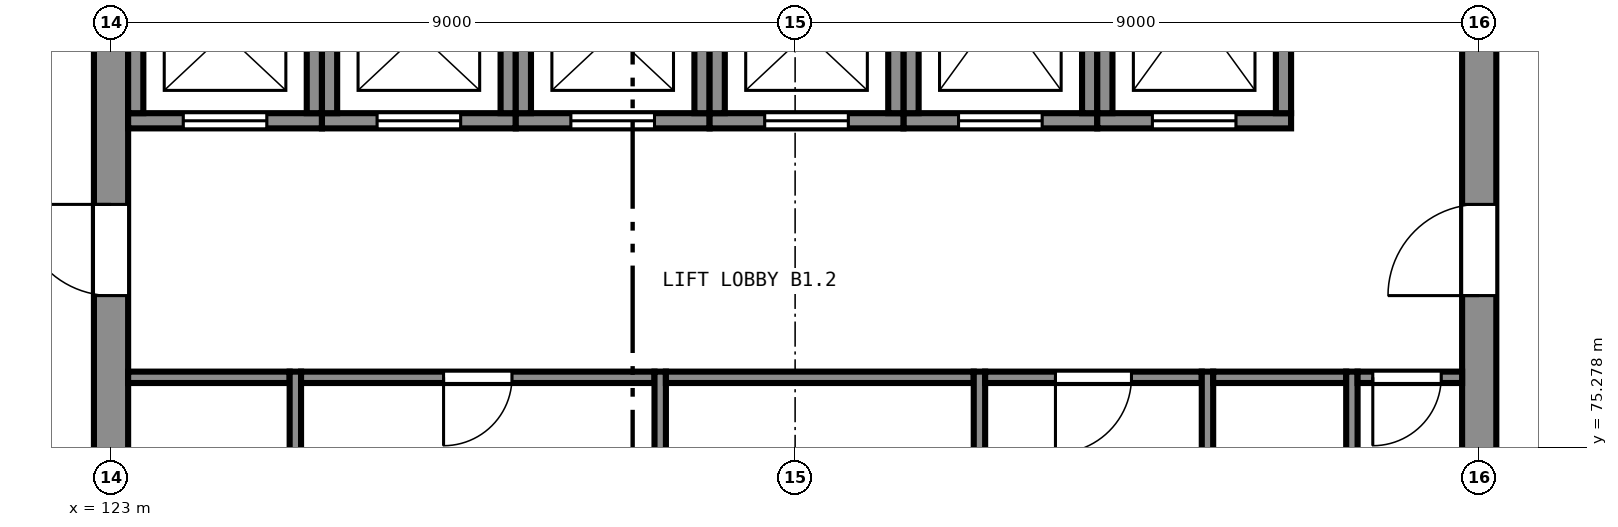
"""IFC4 building model, lengths in metres.
Left out: names, types, materials, properties, quantities, classifications, styles, units other than length and angle.
Written with IfcOpenShell. Run it as: python <this file> out.ifc"""

import sys

from ifc_helpers import new_model, si_unit, direction, frame, frame_2d, origin, place, context, subcontext, project, spatial, rectangle, extrude, element, fill, save


model = new_model("IFC4")
c1 = context("Model", 3, precision=1e-05, world=origin(), true_north=direction((0.0, 1.0)))
c2 = subcontext(c1, "Body", "Model", "MODEL_VIEW")
j1 = project(units=[si_unit("LENGTHUNIT", "METRE"), si_unit("PLANEANGLEUNIT", "RADIAN")], contexts=[c1])
p1 = place(None, origin())
s1 = spatial("IfcSite", under=j1, at=p1, CompositionType="ELEMENT")
p2 = place(p1, origin())
s2 = spatial("IfcBuilding", under=s1, at=p2, CompositionType="ELEMENT")
p3 = place(p2, frame((0.0, 0.0, -5.0)))
s3 = spatial("IfcBuildingStorey", under=s2, at=p3, CompositionType="ELEMENT", Elevation=-5.0)
p4 = place(p3, frame((141.0, 65.225, 0.0), z_axis=(0.0, 0.0, 1.0), x_axis=(0.0, 1.0, 0.0)))
e1 = element("IfcWall", 1, at=p4, inside=s3, PredefinedType="SHEAR", context=c2, shape_type="SweptSolid", body=[
    extrude(rectangle(XDim=17.55, YDim=0.45, at=frame_2d((8.775, 0.0))), origin(), (0.0, 0.0, 1.0), 5.0),
])
p5 = place(p4, frame((4.3, 0.0, 0.0)))
e2 = element("IfcOpeningElement", 2, at=p5, cuts=e1, PredefinedType="OPENING", context=c2, shape_type="SweptSolid", body=[
    extrude(rectangle(XDim=1.2, YDim=2.1, at=frame_2d((0.6, 1.05))), frame((0.0, 0.235, 0.0), z_axis=(0.0, -1.0, 0.0), x_axis=(1.0, 0.0, 0.0)), (0.0, 0.0, 1.0), 0.47),
])
p6 = place(p4, frame((12.05, 0.0, 0.0)))
e3 = element("IfcOpeningElement", 3, at=p6, cuts=e1, PredefinedType="OPENING", context=c2, shape_type="SweptSolid", body=[
    extrude(rectangle(XDim=1.2, YDim=2.1, at=frame_2d((0.6, 1.05))), frame((0.0, 0.235, 0.0), z_axis=(0.0, -1.0, 0.0), x_axis=(1.0, 0.0, 0.0)), (0.0, 0.0, 1.0), 0.47),
])
p7 = place(p3, frame((123.0, 82.775, 0.0), z_axis=(0.0, 0.0, 1.0), x_axis=(0.0, -1.0, 0.0)))
e4 = element("IfcWall", 4, at=p7, inside=s3, PredefinedType="SHEAR", context=c2, shape_type="SweptSolid", body=[
    extrude(rectangle(XDim=17.55, YDim=0.45, at=frame_2d((8.775, 0.0))), origin(), (0.0, 0.0, 1.0), 5.0),
])
p8 = place(p7, frame((12.05, 0.0, 0.0)))
e5 = element("IfcOpeningElement", 5, at=p8, cuts=e4, PredefinedType="OPENING", context=c2, shape_type="SweptSolid", body=[
    extrude(rectangle(XDim=1.2, YDim=2.1, at=frame_2d((0.6, 1.05))), frame((0.0, 0.235, 0.0), z_axis=(0.0, -1.0, 0.0), x_axis=(1.0, 0.0, 0.0)), (0.0, 0.0, 1.0), 0.47),
])
p9 = place(p7, frame((4.3, 0.0, 0.0)))
e6 = element("IfcOpeningElement", 6, at=p9, cuts=e4, PredefinedType="OPENING", context=c2, shape_type="SweptSolid", body=[
    extrude(rectangle(XDim=1.2, YDim=2.1, at=frame_2d((0.6, 1.05))), frame((0.0, 0.235, 0.0), z_axis=(0.0, -1.0, 0.0), x_axis=(1.0, 0.0, 0.0)), (0.0, 0.0, 1.0), 0.47),
])
p10 = place(p3, frame((123.225, 79.575, 0.0), z_axis=(0.0, 0.0, 1.0), x_axis=(1.0, 0.0, 0.0)))
e7 = element("IfcWall", 7, at=p10, inside=s3, PredefinedType="SHEAR", context=c2, shape_type="SweptSolid", body=[
    extrude(rectangle(XDim=2.55, YDim=0.2, at=frame_2d((1.275, 0.0))), origin(), (0.0, 0.0, 1.0), 5.0),
])
p11 = place(p10, frame((0.725, 0.0, 0.0)))
e8 = element("IfcOpeningElement", 8, at=p11, cuts=e7, PredefinedType="OPENING", context=c2, shape_type="SweptSolid", body=[
    extrude(rectangle(XDim=1.1, YDim=2.1, at=frame_2d((0.55, 1.05))), frame((0.0, 0.11, 0.0), z_axis=(0.0, -1.0, 0.0), x_axis=(1.0, 0.0, 0.0)), (0.0, 0.0, 1.0), 0.22),
])
for number, where, z_axis, x_axis in (
    (9, (125.675, 79.675, 0.0), (0.0, 0.0, 1.0), (0.0, 1.0, 0.0)),
    (10, (123.325, 81.775, 0.0), (0.0, 0.0, 1.0), (0.0, -1.0, 0.0)),
):
    element("IfcWall", number, at=place(p3, frame(where, z_axis=z_axis, x_axis=x_axis)), inside=s3, PredefinedType="SHEAR", context=c2, shape_type="SweptSolid", body=[
        extrude(rectangle(XDim=2.1, YDim=0.2, at=frame_2d((1.05, 0.0))), origin(), (0.0, 0.0, 1.0), 5.0),
    ])
p12 = place(p3, frame((125.775, 79.575, 0.0), z_axis=(0.0, 0.0, 1.0), x_axis=(1.0, 0.0, 0.0)))
e11 = element("IfcWall", 11, at=p12, inside=s3, PredefinedType="SHEAR", context=c2, shape_type="SweptSolid", body=[
    extrude(rectangle(XDim=2.55, YDim=0.2, at=frame_2d((1.275, 0.0))), origin(), (0.0, 0.0, 1.0), 5.0),
])
p13 = place(p12, frame((0.725, 0.0, 0.0)))
e12 = element("IfcOpeningElement", 12, at=p13, cuts=e11, PredefinedType="OPENING", context=c2, shape_type="SweptSolid", body=[
    extrude(rectangle(XDim=1.1, YDim=2.1, at=frame_2d((0.55, 1.05))), frame((0.0, 0.11, 0.0), z_axis=(0.0, -1.0, 0.0), x_axis=(1.0, 0.0, 0.0)), (0.0, 0.0, 1.0), 0.22),
])
for number, where, z_axis, x_axis in (
    (13, (128.225, 79.675, 0.0), (0.0, 0.0, 1.0), (0.0, 1.0, 0.0)),
    (14, (125.875, 81.775, 0.0), (0.0, 0.0, 1.0), (0.0, -1.0, 0.0)),
):
    element("IfcWall", number, at=place(p3, frame(where, z_axis=z_axis, x_axis=x_axis)), inside=s3, PredefinedType="SHEAR", context=c2, shape_type="SweptSolid", body=[
        extrude(rectangle(XDim=2.1, YDim=0.2, at=frame_2d((1.05, 0.0))), origin(), (0.0, 0.0, 1.0), 5.0),
    ])
p14 = place(p3, frame((128.325, 79.575, 0.0), z_axis=(0.0, 0.0, 1.0), x_axis=(1.0, 0.0, 0.0)))
e15 = element("IfcWall", 15, at=p14, inside=s3, PredefinedType="SHEAR", context=c2, shape_type="SweptSolid", body=[
    extrude(rectangle(XDim=2.55, YDim=0.2, at=frame_2d((1.275, 0.0))), origin(), (0.0, 0.0, 1.0), 5.0),
])
p15 = place(p14, frame((0.725, 0.0, 0.0)))
e16 = element("IfcOpeningElement", 16, at=p15, cuts=e15, PredefinedType="OPENING", context=c2, shape_type="SweptSolid", body=[
    extrude(rectangle(XDim=1.1, YDim=2.1, at=frame_2d((0.55, 1.05))), frame((0.0, 0.11, 0.0), z_axis=(0.0, -1.0, 0.0), x_axis=(1.0, 0.0, 0.0)), (0.0, 0.0, 1.0), 0.22),
])
for number, where, z_axis, x_axis in (
    (17, (130.775, 79.675, 0.0), (0.0, 0.0, 1.0), (0.0, 1.0, 0.0)),
    (18, (128.425, 81.775, 0.0), (0.0, 0.0, 1.0), (0.0, -1.0, 0.0)),
):
    element("IfcWall", number, at=place(p3, frame(where, z_axis=z_axis, x_axis=x_axis)), inside=s3, PredefinedType="SHEAR", context=c2, shape_type="SweptSolid", body=[
        extrude(rectangle(XDim=2.1, YDim=0.2, at=frame_2d((1.05, 0.0))), origin(), (0.0, 0.0, 1.0), 5.0),
    ])
p16 = place(p3, frame((130.875, 79.575, 0.0), z_axis=(0.0, 0.0, 1.0), x_axis=(1.0, 0.0, 0.0)))
e19 = element("IfcWall", 19, at=p16, inside=s3, PredefinedType="SHEAR", context=c2, shape_type="SweptSolid", body=[
    extrude(rectangle(XDim=2.55, YDim=0.2, at=frame_2d((1.275, 0.0))), origin(), (0.0, 0.0, 1.0), 5.0),
])
p17 = place(p16, frame((0.725, 0.0, 0.0)))
e20 = element("IfcOpeningElement", 20, at=p17, cuts=e19, PredefinedType="OPENING", context=c2, shape_type="SweptSolid", body=[
    extrude(rectangle(XDim=1.1, YDim=2.1, at=frame_2d((0.55, 1.05))), frame((0.0, 0.11, 0.0), z_axis=(0.0, -1.0, 0.0), x_axis=(1.0, 0.0, 0.0)), (0.0, 0.0, 1.0), 0.22),
])
for number, where, z_axis, x_axis in (
    (21, (133.325, 79.675, 0.0), (0.0, 0.0, 1.0), (0.0, 1.0, 0.0)),
    (22, (130.975, 81.775, 0.0), (0.0, 0.0, 1.0), (0.0, -1.0, 0.0)),
):
    element("IfcWall", number, at=place(p3, frame(where, z_axis=z_axis, x_axis=x_axis)), inside=s3, PredefinedType="SHEAR", context=c2, shape_type="SweptSolid", body=[
        extrude(rectangle(XDim=2.1, YDim=0.2, at=frame_2d((1.05, 0.0))), origin(), (0.0, 0.0, 1.0), 5.0),
    ])
p18 = place(p3, frame((133.425, 79.575, 0.0), z_axis=(0.0, 0.0, 1.0), x_axis=(1.0, 0.0, 0.0)))
e23 = element("IfcWall", 23, at=p18, inside=s3, PredefinedType="SHEAR", context=c2, shape_type="SweptSolid", body=[
    extrude(rectangle(XDim=2.55, YDim=0.2, at=frame_2d((1.275, 0.0))), origin(), (0.0, 0.0, 1.0), 5.0),
])
p19 = place(p18, frame((0.725, 0.0, 0.0)))
e24 = element("IfcOpeningElement", 24, at=p19, cuts=e23, PredefinedType="OPENING", context=c2, shape_type="SweptSolid", body=[
    extrude(rectangle(XDim=1.1, YDim=2.1, at=frame_2d((0.55, 1.05))), frame((0.0, 0.11, 0.0), z_axis=(0.0, -1.0, 0.0), x_axis=(1.0, 0.0, 0.0)), (0.0, 0.0, 1.0), 0.22),
])
for number, where, z_axis, x_axis in (
    (25, (135.875, 79.675, 0.0), (0.0, 0.0, 1.0), (0.0, 1.0, 0.0)),
    (26, (133.525, 82.475, 0.0), (0.0, 0.0, 1.0), (0.0, -1.0, 0.0)),
):
    element("IfcWall", number, at=place(p3, frame(where, z_axis=z_axis, x_axis=x_axis)), inside=s3, PredefinedType="SHEAR", context=c2, shape_type="SweptSolid", body=[
        extrude(rectangle(XDim=2.8, YDim=0.2, at=frame_2d((1.4, 0.0))), origin(), (0.0, 0.0, 1.0), 5.0),
    ])
p20 = place(p3, frame((135.975, 79.575, 0.0), z_axis=(0.0, 0.0, 1.0), x_axis=(1.0, 0.0, 0.0)))
e27 = element("IfcWall", 27, at=p20, inside=s3, PredefinedType="SHEAR", context=c2, shape_type="SweptSolid", body=[
    extrude(rectangle(XDim=2.55, YDim=0.2, at=frame_2d((1.275, 0.0))), origin(), (0.0, 0.0, 1.0), 5.0),
])
p21 = place(p20, frame((0.725, 0.0, 0.0)))
e28 = element("IfcOpeningElement", 28, at=p21, cuts=e27, PredefinedType="OPENING", context=c2, shape_type="SweptSolid", body=[
    extrude(rectangle(XDim=1.1, YDim=2.1, at=frame_2d((0.55, 1.05))), frame((0.0, 0.11, 0.0), z_axis=(0.0, -1.0, 0.0), x_axis=(1.0, 0.0, 0.0)), (0.0, 0.0, 1.0), 0.22),
])
for number, where, z_axis, x_axis in (
    (29, (138.425, 79.675, 0.0), (0.0, 0.0, 1.0), (0.0, 1.0, 0.0)),
    (30, (136.075, 82.475, 0.0), (0.0, 0.0, 1.0), (0.0, -1.0, 0.0)),
):
    element("IfcWall", number, at=place(p3, frame(where, z_axis=z_axis, x_axis=x_axis)), inside=s3, PredefinedType="SHEAR", context=c2, shape_type="SweptSolid", body=[
        extrude(rectangle(XDim=2.8, YDim=0.2, at=frame_2d((1.4, 0.0))), origin(), (0.0, 0.0, 1.0), 5.0),
    ])
p22 = place(p3, frame((125.425, 71.725, 0.0), z_axis=(0.0, 0.0, 1.0), x_axis=(0.0, 1.0, 0.0)))
e31 = element("IfcWall", 31, at=p22, inside=s3, PredefinedType="PARTITIONING", context=c2, shape_type="SweptSolid", body=[
    extrude(rectangle(XDim=4.55, YDim=0.15, at=frame_2d((2.275, 0.0))), origin(), (0.0, 0.0, 1.0), 4.58),
])
p23 = place(p3, frame((123.225, 76.2, 0.0), z_axis=(0.0, 0.0, 1.0), x_axis=(1.0, 0.0, 0.0)))
e32 = element("IfcWall", 32, at=p23, inside=s3, PredefinedType="PARTITIONING", context=c2, shape_type="SweptSolid", body=[
    extrude(rectangle(XDim=2.125, YDim=0.15, at=frame_2d((1.062, 0.0))), origin(), (0.0, 0.0, 1.0), 4.58),
])
p24 = place(p3, frame((130.225, 71.725, 0.0), z_axis=(0.0, 0.0, 1.0), x_axis=(0.0, 1.0, 0.0)))
e33 = element("IfcWall", 33, at=p24, inside=s3, PredefinedType="PARTITIONING", context=c2, shape_type="SweptSolid", body=[
    extrude(rectangle(XDim=4.55, YDim=0.15, at=frame_2d((2.275, 0.0))), origin(), (0.0, 0.0, 1.0), 4.58),
])
p25 = place(p3, frame((125.5, 76.2, 0.0), z_axis=(0.0, 0.0, 1.0), x_axis=(1.0, 0.0, 0.0)))
e34 = element("IfcWall", 34, at=p25, inside=s3, PredefinedType="PARTITIONING", context=c2, shape_type="SweptSolid", body=[
    extrude(rectangle(XDim=4.65, YDim=0.15, at=frame_2d((2.325, 0.0))), origin(), (0.0, 0.0, 1.0), 4.58),
])
p26 = place(p25, frame((1.875, 0.0, 0.0)))
e35 = element("IfcOpeningElement", 35, at=p26, cuts=e34, PredefinedType="OPENING", context=c2, shape_type="SweptSolid", body=[
    extrude(rectangle(XDim=0.9, YDim=2.1, at=frame_2d((0.45, 1.05))), frame((0.0, 0.085, 0.0), z_axis=(0.0, -1.0, 0.0), x_axis=(1.0, 0.0, 0.0)), (0.0, 0.0, 1.0), 0.17),
])
p27 = place(p3, frame((134.425, 71.725, 0.0), z_axis=(0.0, 0.0, 1.0), x_axis=(0.0, 1.0, 0.0)))
e36 = element("IfcWall", 36, at=p27, inside=s3, PredefinedType="PARTITIONING", context=c2, shape_type="SweptSolid", body=[
    extrude(rectangle(XDim=4.55, YDim=0.15, at=frame_2d((2.275, 0.0))), origin(), (0.0, 0.0, 1.0), 4.58),
])
p28 = place(p3, frame((130.3, 76.2, 0.0), z_axis=(0.0, 0.0, 1.0), x_axis=(1.0, 0.0, 0.0)))
e37 = element("IfcWall", 37, at=p28, inside=s3, PredefinedType="PARTITIONING", context=c2, shape_type="SweptSolid", body=[
    extrude(rectangle(XDim=4.05, YDim=0.15, at=frame_2d((2.025, 0.0))), origin(), (0.0, 0.0, 1.0), 4.58),
])
p29 = place(p3, frame((137.425, 71.725, 0.0), z_axis=(0.0, 0.0, 1.0), x_axis=(0.0, 1.0, 0.0)))
e38 = element("IfcWall", 38, at=p29, inside=s3, PredefinedType="PARTITIONING", context=c2, shape_type="SweptSolid", body=[
    extrude(rectangle(XDim=4.55, YDim=0.15, at=frame_2d((2.275, 0.0))), origin(), (0.0, 0.0, 1.0), 4.58),
])
p30 = place(p3, frame((134.5, 76.2, 0.0), z_axis=(0.0, 0.0, 1.0), x_axis=(1.0, 0.0, 0.0)))
e39 = element("IfcWall", 39, at=p30, inside=s3, PredefinedType="PARTITIONING", context=c2, shape_type="SweptSolid", body=[
    extrude(rectangle(XDim=2.85, YDim=0.15, at=frame_2d((1.425, 0.0))), origin(), (0.0, 0.0, 1.0), 4.58),
])
p31 = place(p30, frame((0.925, 0.0, 0.0)))
e40 = element("IfcOpeningElement", 40, at=p31, cuts=e39, PredefinedType="OPENING", context=c2, shape_type="SweptSolid", body=[
    extrude(rectangle(XDim=1.0, YDim=2.1, at=frame_2d((0.5, 1.05))), frame((0.0, 0.085, 0.0), z_axis=(0.0, -1.0, 0.0), x_axis=(1.0, 0.0, 0.0)), (0.0, 0.0, 1.0), 0.17),
])
p32 = place(p3, frame((139.325, 71.725, 0.0), z_axis=(0.0, 0.0, 1.0), x_axis=(0.0, 1.0, 0.0)))
e41 = element("IfcWall", 41, at=p32, inside=s3, PredefinedType="PARTITIONING", context=c2, shape_type="SweptSolid", body=[
    extrude(rectangle(XDim=4.55, YDim=0.15, at=frame_2d((2.275, 0.0))), origin(), (0.0, 0.0, 1.0), 4.58),
])
p33 = place(p3, frame((137.5, 76.2, 0.0), z_axis=(0.0, 0.0, 1.0), x_axis=(1.0, 0.0, 0.0)))
e42 = element("IfcWall", 42, at=p33, inside=s3, PredefinedType="PARTITIONING", context=c2, shape_type="SweptSolid", body=[
    extrude(rectangle(XDim=1.75, YDim=0.15, at=frame_2d((0.875, 0.0))), origin(), (0.0, 0.0, 1.0), 4.58),
])
p34 = place(p3, frame((139.4, 76.2, 0.0), z_axis=(0.0, 0.0, 1.0), x_axis=(1.0, 0.0, 0.0)))
e43 = element("IfcWall", 43, at=p34, inside=s3, PredefinedType="PARTITIONING", context=c2, shape_type="SweptSolid", body=[
    extrude(rectangle(XDim=1.375, YDim=0.15, at=frame_2d((0.688, 0.0))), origin(), (0.0, 0.0, 1.0), 4.58),
])
p35 = place(p34, frame((0.2, 0.0, 0.0)))
e44 = element("IfcOpeningElement", 44, at=p35, cuts=e43, PredefinedType="OPENING", context=c2, shape_type="SweptSolid", body=[
    extrude(rectangle(XDim=0.9, YDim=2.1, at=frame_2d((0.45, 1.05))), frame((0.0, 0.085, 0.0), z_axis=(0.0, -1.0, 0.0), x_axis=(1.0, 0.0, 0.0)), (0.0, 0.0, 1.0), 0.17),
])
p36 = place(p11, origin())
e45 = element("IfcDoor", 45, at=p36, inside=s3, OperationType="SLIDING_TO_LEFT", PredefinedType="DOOR", context=c2, shape_type="SweptSolid", body=[
    extrude(rectangle(XDim=1.1, YDim=2.1, at=frame_2d((0.55, 1.05))), frame((0.0, 0.025, 0.0), z_axis=(0.0, -1.0, 0.0), x_axis=(1.0, 0.0, 0.0)), (0.0, 0.0, 1.0), 0.05),
])
fill(e8, e45)
p37 = place(p13, origin())
e46 = element("IfcDoor", 46, at=p37, inside=s3, OperationType="SLIDING_TO_LEFT", PredefinedType="DOOR", context=c2, shape_type="SweptSolid", body=[
    extrude(rectangle(XDim=1.1, YDim=2.1, at=frame_2d((0.55, 1.05))), frame((0.0, 0.025, 0.0), z_axis=(0.0, -1.0, 0.0), x_axis=(1.0, 0.0, 0.0)), (0.0, 0.0, 1.0), 0.05),
])
fill(e12, e46)
p38 = place(p15, origin())
e47 = element("IfcDoor", 47, at=p38, inside=s3, OperationType="SLIDING_TO_LEFT", PredefinedType="DOOR", context=c2, shape_type="SweptSolid", body=[
    extrude(rectangle(XDim=1.1, YDim=2.1, at=frame_2d((0.55, 1.05))), frame((0.0, 0.025, 0.0), z_axis=(0.0, -1.0, 0.0), x_axis=(1.0, 0.0, 0.0)), (0.0, 0.0, 1.0), 0.05),
])
fill(e16, e47)
p39 = place(p17, origin())
e48 = element("IfcDoor", 48, at=p39, inside=s3, OperationType="SLIDING_TO_LEFT", PredefinedType="DOOR", context=c2, shape_type="SweptSolid", body=[
    extrude(rectangle(XDim=1.1, YDim=2.1, at=frame_2d((0.55, 1.05))), frame((0.0, 0.025, 0.0), z_axis=(0.0, -1.0, 0.0), x_axis=(1.0, 0.0, 0.0)), (0.0, 0.0, 1.0), 0.05),
])
fill(e20, e48)
p40 = place(p19, origin())
e49 = element("IfcDoor", 49, at=p40, inside=s3, OperationType="SLIDING_TO_LEFT", PredefinedType="DOOR", context=c2, shape_type="SweptSolid", body=[
    extrude(rectangle(XDim=1.1, YDim=2.1, at=frame_2d((0.55, 1.05))), frame((0.0, 0.025, 0.0), z_axis=(0.0, -1.0, 0.0), x_axis=(1.0, 0.0, 0.0)), (0.0, 0.0, 1.0), 0.05),
])
fill(e24, e49)
p41 = place(p21, origin())
e50 = element("IfcDoor", 50, at=p41, inside=s3, OperationType="SLIDING_TO_LEFT", PredefinedType="DOOR", context=c2, shape_type="SweptSolid", body=[
    extrude(rectangle(XDim=1.1, YDim=2.1, at=frame_2d((0.55, 1.05))), frame((0.0, 0.025, 0.0), z_axis=(0.0, -1.0, 0.0), x_axis=(1.0, 0.0, 0.0)), (0.0, 0.0, 1.0), 0.05),
])
fill(e28, e50)
p42 = place(p9, frame((1.2, 0.0, 0.0), z_axis=(0.0, 0.0, 1.0), x_axis=(-1.0, 0.0, 0.0)))
e51 = element("IfcDoor", 51, at=p42, inside=s3, OperationType="SINGLE_SWING_LEFT", PredefinedType="DOOR", context=c2, shape_type="SweptSolid", body=[
    extrude(rectangle(XDim=1.2, YDim=2.1, at=frame_2d((0.6, 1.05))), frame((0.0, 0.025, 0.0), z_axis=(0.0, -1.0, 0.0), x_axis=(1.0, 0.0, 0.0)), (0.0, 0.0, 1.0), 0.05),
])
fill(e6, e51)
p43 = place(p6, origin())
e52 = element("IfcDoor", 52, at=p43, inside=s3, OperationType="SINGLE_SWING_RIGHT", PredefinedType="DOOR", context=c2, shape_type="SweptSolid", body=[
    extrude(rectangle(XDim=1.2, YDim=2.1, at=frame_2d((0.6, 1.05))), frame((0.0, 0.025, 0.0), z_axis=(0.0, -1.0, 0.0), x_axis=(1.0, 0.0, 0.0)), (0.0, 0.0, 1.0), 0.05),
])
fill(e3, e52)
p44 = place(p26, frame((0.9, 0.0, 0.0), z_axis=(0.0, 0.0, 1.0), x_axis=(-1.0, 0.0, 0.0)))
e53 = element("IfcDoor", 53, at=p44, inside=s3, OperationType="SINGLE_SWING_LEFT", PredefinedType="DOOR", context=c2, shape_type="SweptSolid", body=[
    extrude(rectangle(XDim=0.9, YDim=2.1, at=frame_2d((0.45, 1.05))), frame((0.0, 0.025, 0.0), z_axis=(0.0, -1.0, 0.0), x_axis=(1.0, 0.0, 0.0)), (0.0, 0.0, 1.0), 0.05),
])
fill(e35, e53)
p45 = place(p31, frame((1.0, 0.0, 0.0), z_axis=(0.0, 0.0, 1.0), x_axis=(-1.0, 0.0, 0.0)))
e54 = element("IfcDoor", 54, at=p45, inside=s3, OperationType="SINGLE_SWING_LEFT", PredefinedType="DOOR", context=c2, shape_type="SweptSolid", body=[
    extrude(rectangle(XDim=1.0, YDim=2.1, at=frame_2d((0.5, 1.05))), frame((0.0, 0.025, 0.0), z_axis=(0.0, -1.0, 0.0), x_axis=(1.0, 0.0, 0.0)), (0.0, 0.0, 1.0), 0.05),
])
fill(e40, e54)
p46 = place(p35, frame((0.9, 0.0, 0.0), z_axis=(0.0, 0.0, 1.0), x_axis=(-1.0, 0.0, 0.0)))
e55 = element("IfcDoor", 55, at=p46, inside=s3, OperationType="SINGLE_SWING_LEFT", PredefinedType="DOOR", context=c2, shape_type="SweptSolid", body=[
    extrude(rectangle(XDim=0.9, YDim=2.1, at=frame_2d((0.45, 1.05))), frame((0.0, 0.025, 0.0), z_axis=(0.0, -1.0, 0.0), x_axis=(1.0, 0.0, 0.0)), (0.0, 0.0, 1.0), 0.05),
])
fill(e44, e55)
save(model, sys.argv[1])
